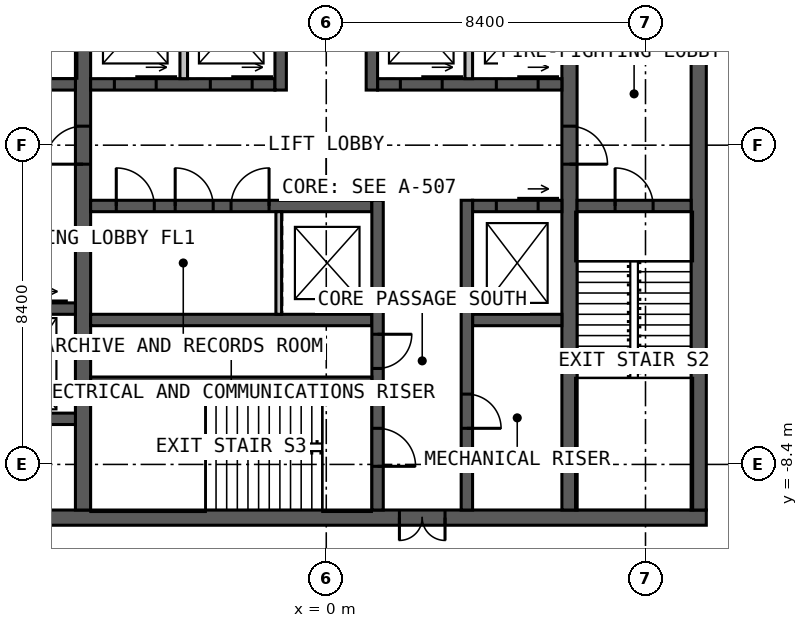
"""IFC4 building model, lengths in metres.
Left out: names, types, materials, properties, quantities, classifications, styles, units other than length and angle.
Written with IfcOpenShell. Run it as: python <this file> out.ifc"""

import sys

from ifc_helpers import new_model, si_unit, direction, frame, frame_2d, origin, place, context, subcontext, project, spatial, rectangle, extrude, element, fill, save


model = new_model("IFC4")
c1 = context("Model", 3, precision=1e-05, world=origin(), true_north=direction((0.0, 1.0)))
c2 = subcontext(c1, "Body", "Model", "MODEL_VIEW")
j1 = project(units=[si_unit("LENGTHUNIT", "METRE"), si_unit("PLANEANGLEUNIT", "RADIAN")], contexts=[c1])
p1 = place(None, origin())
s1 = spatial("IfcSite", under=j1, at=p1, CompositionType="ELEMENT")
p2 = place(p1, origin())
s2 = spatial("IfcBuilding", under=s1, at=p2, CompositionType="ELEMENT")
p3 = place(p2, frame((0.0, 0.0, 272.0)))
s3 = spatial("IfcBuildingStorey", under=s2, at=p3, CompositionType="ELEMENT", Elevation=272.0)
p4 = place(p3, frame((10.0, -9.8, 0.0), z_axis=(0.0, 0.0, 1.0), x_axis=(-1.0, 0.0, 0.0)))
e1 = element("IfcWall", 1, at=p4, inside=s3, PredefinedType="SOLIDWALL", context=c2, shape_type="SweptSolid", body=[
    extrude(rectangle(XDim=20.0, YDim=0.4, at=frame_2d((10.0, 0.0))), origin(), (0.0, 0.0, 1.0), 4.0),
])
p5 = place(p4, frame((6.875, 0.0, 0.0)))
e2 = element("IfcOpeningElement", 2, at=p5, cuts=e1, PredefinedType="OPENING", context=c2, shape_type="SweptSolid", body=[
    extrude(rectangle(XDim=1.2, YDim=2.2, at=frame_2d((0.6, 1.1))), frame((0.0, 0.21, 0.0), z_axis=(0.0, -1.0, 0.0), x_axis=(1.0, 0.0, 0.0)), (0.0, 0.0, 1.0), 0.42),
])
p6 = place(p3, frame((9.8, -9.6, 0.0), z_axis=(0.0, 0.0, 1.0), x_axis=(0.0, 1.0, 0.0)))
e3 = element("IfcWall", 3, at=p6, inside=s3, PredefinedType="SOLIDWALL", context=c2, shape_type="SweptSolid", body=[
    extrude(rectangle(XDim=19.2, YDim=0.4, at=frame_2d((9.6, 0.0))), origin(), (0.0, 0.0, 1.0), 4.0),
])
p7 = place(p3, frame((-6.4, -9.6, 0.0), z_axis=(0.0, 0.0, 1.0), x_axis=(0.0, 1.0, 0.0)))
e4 = element("IfcWall", 4, at=p7, inside=s3, PredefinedType="SOLIDWALL", context=c2, shape_type="SweptSolid", body=[
    extrude(rectangle(XDim=19.2, YDim=0.4, at=frame_2d((9.6, 0.0))), origin(), (0.0, 0.0, 1.0), 4.0),
])
p8 = place(p7, frame((9.1, 0.0, 0.0)))
e5 = element("IfcOpeningElement", 5, at=p8, cuts=e4, PredefinedType="OPENING", context=c2, shape_type="SweptSolid", body=[
    extrude(rectangle(XDim=1.0, YDim=2.2, at=frame_2d((0.5, 1.1))), frame((0.0, 0.21, 0.0), z_axis=(0.0, -1.0, 0.0), x_axis=(1.0, 0.0, 0.0)), (0.0, 0.0, 1.0), 0.42),
])
p9 = place(p3, frame((6.4, 9.6, 0.0), z_axis=(0.0, 0.0, 1.0), x_axis=(0.0, -1.0, 0.0)))
e6 = element("IfcWall", 6, at=p9, inside=s3, PredefinedType="SOLIDWALL", context=c2, shape_type="SweptSolid", body=[
    extrude(rectangle(XDim=19.2, YDim=0.4, at=frame_2d((9.6, 0.0))), origin(), (0.0, 0.0, 1.0), 4.0),
])
p10 = place(p9, frame((9.1, 0.0, 0.0)))
e7 = element("IfcOpeningElement", 7, at=p10, cuts=e6, PredefinedType="OPENING", context=c2, shape_type="SweptSolid", body=[
    extrude(rectangle(XDim=1.0, YDim=2.2, at=frame_2d((0.5, 1.1))), frame((0.0, 0.21, 0.0), z_axis=(0.0, -1.0, 0.0), x_axis=(1.0, 0.0, 0.0)), (0.0, 0.0, 1.0), 0.42),
])
p11 = place(p3, frame((-6.2, 1.6, 0.0), z_axis=(0.0, 0.0, 1.0), x_axis=(1.0, 0.0, 0.0)))
e8 = element("IfcWall", 8, at=p11, inside=s3, PredefinedType="SOLIDWALL", context=c2, shape_type="SweptSolid", body=[
    extrude(rectangle(XDim=4.85, YDim=0.3, at=frame_2d((2.425, 0.0))), origin(), (0.0, 0.0, 1.0), 4.0),
])
p12 = place(p11, frame((0.625, 0.0, 0.0)))
e9 = element("IfcOpeningElement", 9, at=p12, cuts=e8, PredefinedType="OPENING", context=c2, shape_type="SweptSolid", body=[
    extrude(rectangle(XDim=1.1, YDim=2.2, at=frame_2d((0.55, 1.1))), frame((0.0, 0.16, 0.0), z_axis=(0.0, -1.0, 0.0), x_axis=(1.0, 0.0, 0.0)), (0.0, 0.0, 1.0), 0.32),
])
p13 = place(p11, frame((3.15, 0.0, 0.0)))
e10 = element("IfcOpeningElement", 10, at=p13, cuts=e8, PredefinedType="OPENING", context=c2, shape_type="SweptSolid", body=[
    extrude(rectangle(XDim=1.1, YDim=2.2, at=frame_2d((0.55, 1.1))), frame((0.0, 0.16, 0.0), z_axis=(0.0, -1.0, 0.0), x_axis=(1.0, 0.0, 0.0)), (0.0, 0.0, 1.0), 0.32),
])
p14 = place(p3, frame((1.35, 1.6, 0.0), z_axis=(0.0, 0.0, 1.0), x_axis=(1.0, 0.0, 0.0)))
e11 = element("IfcWall", 11, at=p14, inside=s3, PredefinedType="SOLIDWALL", context=c2, shape_type="SweptSolid", body=[
    extrude(rectangle(XDim=4.85, YDim=0.3, at=frame_2d((2.425, 0.0))), origin(), (0.0, 0.0, 1.0), 4.0),
])
p15 = place(p14, frame((0.6, 0.0, 0.0)))
e12 = element("IfcOpeningElement", 12, at=p15, cuts=e11, PredefinedType="OPENING", context=c2, shape_type="SweptSolid", body=[
    extrude(rectangle(XDim=1.1, YDim=2.2, at=frame_2d((0.55, 1.1))), frame((0.0, 0.16, 0.0), z_axis=(0.0, -1.0, 0.0), x_axis=(1.0, 0.0, 0.0)), (0.0, 0.0, 1.0), 0.32),
])
p16 = place(p14, frame((3.125, 0.0, 0.0)))
e13 = element("IfcOpeningElement", 13, at=p16, cuts=e11, PredefinedType="OPENING", context=c2, shape_type="SweptSolid", body=[
    extrude(rectangle(XDim=1.1, YDim=2.2, at=frame_2d((0.55, 1.1))), frame((0.0, 0.16, 0.0), z_axis=(0.0, -1.0, 0.0), x_axis=(1.0, 0.0, 0.0)), (0.0, 0.0, 1.0), 0.32),
])
p17 = place(p3, frame((-1.2, 1.45, 0.0), z_axis=(0.0, 0.0, 1.0), x_axis=(0.0, 1.0, 0.0)))
e14 = element("IfcWall", 14, at=p17, inside=s3, PredefinedType="SOLIDWALL", context=c2, shape_type="SweptSolid", body=[
    extrude(rectangle(XDim=8.15, YDim=0.3, at=frame_2d((4.075, 0.0))), origin(), (0.0, 0.0, 1.0), 4.0),
])
p18 = place(p17, frame((5.05, 0.0, 0.0)))
e15 = element("IfcOpeningElement", 15, at=p18, cuts=e14, PredefinedType="OPENING", context=c2, shape_type="SweptSolid", body=[
    extrude(rectangle(XDim=1.0, YDim=2.2, at=frame_2d((0.5, 1.1))), frame((0.0, 0.16, 0.0), z_axis=(0.0, -1.0, 0.0), x_axis=(1.0, 0.0, 0.0)), (0.0, 0.0, 1.0), 0.32),
])
p19 = place(p3, frame((1.2, 1.45, 0.0), z_axis=(0.0, 0.0, 1.0), x_axis=(0.0, 1.0, 0.0)))
e16 = element("IfcWall", 16, at=p19, inside=s3, PredefinedType="SOLIDWALL", context=c2, shape_type="SweptSolid", body=[
    extrude(rectangle(XDim=8.15, YDim=0.3, at=frame_2d((4.075, 0.0))), origin(), (0.0, 0.0, 1.0), 4.0),
])
p20 = place(p19, frame((3.8, 0.0, 0.0)))
e17 = element("IfcOpeningElement", 17, at=p20, cuts=e16, PredefinedType="OPENING", context=c2, shape_type="SweptSolid", body=[
    extrude(rectangle(XDim=1.0, YDim=2.2, at=frame_2d((0.5, 1.1))), frame((0.0, 0.16, 0.0), z_axis=(0.0, -1.0, 0.0), x_axis=(1.0, 0.0, 0.0)), (0.0, 0.0, 1.0), 0.32),
])
p21 = place(p19, frame((6.15, 0.0, 0.0)))
e18 = element("IfcOpeningElement", 18, at=p21, cuts=e16, PredefinedType="OPENING", context=c2, shape_type="SweptSolid", body=[
    extrude(rectangle(XDim=1.0, YDim=2.2, at=frame_2d((0.5, 1.1))), frame((0.0, 0.16, 0.0), z_axis=(0.0, -1.0, 0.0), x_axis=(1.0, 0.0, 0.0)), (0.0, 0.0, 1.0), 0.32),
])
p22 = place(p3, frame((-6.2, -1.6, 0.0), z_axis=(0.0, 0.0, 1.0), x_axis=(1.0, 0.0, 0.0)))
e19 = element("IfcWall", 19, at=p22, inside=s3, PredefinedType="SOLIDWALL", context=c2, shape_type="SweptSolid", body=[
    extrude(rectangle(XDim=7.4, YDim=0.3, at=frame_2d((3.7, 0.0))), origin(), (0.0, 0.0, 1.0), 4.0),
])
p23 = place(p22, frame((0.675, 0.0, 0.0)))
e20 = element("IfcOpeningElement", 20, at=p23, cuts=e19, PredefinedType="OPENING", context=c2, shape_type="SweptSolid", body=[
    extrude(rectangle(XDim=1.0, YDim=2.2, at=frame_2d((0.5, 1.1))), frame((0.0, 0.16, 0.0), z_axis=(0.0, -1.0, 0.0), x_axis=(1.0, 0.0, 0.0)), (0.0, 0.0, 1.0), 0.32),
])
p24 = place(p22, frame((2.225, 0.0, 0.0)))
e21 = element("IfcOpeningElement", 21, at=p24, cuts=e19, PredefinedType="OPENING", context=c2, shape_type="SweptSolid", body=[
    extrude(rectangle(XDim=1.0, YDim=2.2, at=frame_2d((0.5, 1.1))), frame((0.0, 0.16, 0.0), z_axis=(0.0, -1.0, 0.0), x_axis=(1.0, 0.0, 0.0)), (0.0, 0.0, 1.0), 0.32),
])
p25 = place(p22, frame((3.695, 0.0, 0.0)))
e22 = element("IfcOpeningElement", 22, at=p25, cuts=e19, PredefinedType="OPENING", context=c2, shape_type="SweptSolid", body=[
    extrude(rectangle(XDim=1.0, YDim=2.2, at=frame_2d((0.5, 1.1))), frame((0.0, 0.16, 0.0), z_axis=(0.0, -1.0, 0.0), x_axis=(1.0, 0.0, 0.0)), (0.0, 0.0, 1.0), 0.32),
])
p26 = place(p3, frame((3.85, -1.6, 0.0), z_axis=(0.0, 0.0, 1.0), x_axis=(1.0, 0.0, 0.0)))
e23 = element("IfcWall", 23, at=p26, inside=s3, PredefinedType="SOLIDWALL", context=c2, shape_type="SweptSolid", body=[
    extrude(rectangle(XDim=2.35, YDim=0.3, at=frame_2d((1.175, 0.0))), origin(), (0.0, 0.0, 1.0), 4.0),
])
p27 = place(p26, frame((0.625, 0.0, 0.0)))
e24 = element("IfcOpeningElement", 24, at=p27, cuts=e23, PredefinedType="OPENING", context=c2, shape_type="SweptSolid", body=[
    extrude(rectangle(XDim=1.1, YDim=2.2, at=frame_2d((0.55, 1.1))), frame((0.0, 0.16, 0.0), z_axis=(0.0, -1.0, 0.0), x_axis=(1.0, 0.0, 0.0)), (0.0, 0.0, 1.0), 0.32),
])
p28 = place(p3, frame((-6.2, -4.6, 0.0), z_axis=(0.0, 0.0, 1.0), x_axis=(1.0, 0.0, 0.0)))
e25 = element("IfcWall", 25, at=p28, inside=s3, PredefinedType="SOLIDWALL", context=c2, shape_type="SweptSolid", body=[
    extrude(rectangle(XDim=7.4, YDim=0.3, at=frame_2d((3.7, 0.0))), origin(), (0.0, 0.0, 1.0), 4.0),
])
p29 = place(p3, frame((3.85, -4.6, 0.0), z_axis=(0.0, 0.0, 1.0), x_axis=(1.0, 0.0, 0.0)))
e26 = element("IfcWall", 26, at=p29, inside=s3, PredefinedType="SOLIDWALL", context=c2, shape_type="SweptSolid", body=[
    extrude(rectangle(XDim=2.35, YDim=0.3, at=frame_2d((1.175, 0.0))), origin(), (0.0, 0.0, 1.0), 4.0),
])
p30 = place(p3, frame((1.35, -1.45, 0.0), z_axis=(0.0, 0.0, 1.0), x_axis=(0.0, -1.0, 0.0)))
e27 = element("IfcWall", 27, at=p30, inside=s3, PredefinedType="SOLIDWALL", context=c2, shape_type="SweptSolid", body=[
    extrude(rectangle(XDim=8.15, YDim=0.3, at=frame_2d((4.075, 0.0))), origin(), (0.0, 0.0, 1.0), 4.0),
])
p31 = place(p30, frame((6.0, 0.0, 0.0)))
e28 = element("IfcOpeningElement", 28, at=p31, cuts=e27, PredefinedType="OPENING", context=c2, shape_type="SweptSolid", body=[
    extrude(rectangle(XDim=1.0, YDim=2.2, at=frame_2d((0.5, 1.1))), frame((0.0, 0.16, 0.0), z_axis=(0.0, -1.0, 0.0), x_axis=(1.0, 0.0, 0.0)), (0.0, 0.0, 1.0), 0.32),
])
p32 = place(p30, frame((3.525, 0.0, 0.0)))
e29 = element("IfcOpeningElement", 29, at=p32, cuts=e27, PredefinedType="OPENING", context=c2, shape_type="SweptSolid", body=[
    extrude(rectangle(XDim=0.9, YDim=2.2, at=frame_2d((0.45, 1.1))), frame((0.0, 0.16, 0.0), z_axis=(0.0, -1.0, 0.0), x_axis=(1.0, 0.0, 0.0)), (0.0, 0.0, 1.0), 0.32),
])
p33 = place(p3, frame((3.7, -1.45, 0.0), z_axis=(0.0, 0.0, 1.0), x_axis=(0.0, -1.0, 0.0)))
e30 = element("IfcWall", 30, at=p33, inside=s3, PredefinedType="SOLIDWALL", context=c2, shape_type="SweptSolid", body=[
    extrude(rectangle(XDim=8.15, YDim=0.3, at=frame_2d((4.075, 0.0))), origin(), (0.0, 0.0, 1.0), 4.0),
])
p34 = place(p33, frame((5.1, 0.0, 0.0)))
e31 = element("IfcOpeningElement", 31, at=p34, cuts=e30, PredefinedType="OPENING", context=c2, shape_type="SweptSolid", body=[
    extrude(rectangle(XDim=0.9, YDim=2.2, at=frame_2d((0.45, 1.1))), frame((0.0, 0.16, 0.0), z_axis=(0.0, -1.0, 0.0), x_axis=(1.0, 0.0, 0.0)), (0.0, 0.0, 1.0), 0.32),
])
p35 = place(p3, frame((-6.2, -6.2, 0.0), z_axis=(0.0, 0.0, 1.0), x_axis=(1.0, 0.0, 0.0)))
e32 = element("IfcWall", 32, at=p35, inside=s3, PredefinedType="SOLIDWALL", context=c2, shape_type="SweptSolid", body=[
    extrude(rectangle(XDim=7.4, YDim=0.2, at=frame_2d((3.7, 0.0))), origin(), (0.0, 0.0, 1.0), 4.0),
])
p36 = place(p3, frame((-9.6, 1.6, 0.0), z_axis=(0.0, 0.0, 1.0), x_axis=(1.0, 0.0, 0.0)))
e33 = element("IfcWall", 33, at=p36, inside=s3, PredefinedType="SOLIDWALL", context=c2, shape_type="SweptSolid", body=[
    extrude(rectangle(XDim=3.0, YDim=0.3, at=frame_2d((1.5, 0.0))), origin(), (0.0, 0.0, 1.0), 4.0),
])
p37 = place(p36, frame((1.0, 0.0, 0.0)))
e34 = element("IfcOpeningElement", 34, at=p37, cuts=e33, PredefinedType="OPENING", context=c2, shape_type="SweptSolid", body=[
    extrude(rectangle(XDim=1.0, YDim=2.2, at=frame_2d((0.5, 1.1))), frame((0.0, 0.16, 0.0), z_axis=(0.0, -1.0, 0.0), x_axis=(1.0, 0.0, 0.0)), (0.0, 0.0, 1.0), 0.32),
])
p38 = place(p3, frame((6.6, -1.6, 0.0), z_axis=(0.0, 0.0, 1.0), x_axis=(1.0, 0.0, 0.0)))
e35 = element("IfcWall", 35, at=p38, inside=s3, PredefinedType="SOLIDWALL", context=c2, shape_type="SweptSolid", body=[
    extrude(rectangle(XDim=3.0, YDim=0.3, at=frame_2d((1.5, 0.0))), origin(), (0.0, 0.0, 1.0), 4.0),
])
p39 = place(p38, frame((1.0, 0.0, 0.0)))
e36 = element("IfcOpeningElement", 36, at=p39, cuts=e35, PredefinedType="OPENING", context=c2, shape_type="SweptSolid", body=[
    extrude(rectangle(XDim=1.0, YDim=2.2, at=frame_2d((0.5, 1.1))), frame((0.0, 0.16, 0.0), z_axis=(0.0, -1.0, 0.0), x_axis=(1.0, 0.0, 0.0)), (0.0, 0.0, 1.0), 0.32),
])
p40 = place(p3, frame((-9.6, -4.3, 0.0), z_axis=(0.0, 0.0, 1.0), x_axis=(1.0, 0.0, 0.0)))
e37 = element("IfcWall", 37, at=p40, inside=s3, PredefinedType="SOLIDWALL", context=c2, shape_type="SweptSolid", body=[
    extrude(rectangle(XDim=3.0, YDim=0.3, at=frame_2d((1.5, 0.0))), origin(), (0.0, 0.0, 1.0), 4.0),
])
p41 = place(p40, frame((1.15, 0.0, 0.0)))
e38 = element("IfcOpeningElement", 38, at=p41, cuts=e37, PredefinedType="OPENING", context=c2, shape_type="SweptSolid", body=[
    extrude(rectangle(XDim=1.1, YDim=2.2, at=frame_2d((0.55, 1.1))), frame((0.0, 0.16, 0.0), z_axis=(0.0, -1.0, 0.0), x_axis=(1.0, 0.0, 0.0)), (0.0, 0.0, 1.0), 0.32),
])
p42 = place(p3, frame((-9.6, -7.2, 0.0), z_axis=(0.0, 0.0, 1.0), x_axis=(1.0, 0.0, 0.0)))
e39 = element("IfcWall", 39, at=p42, inside=s3, PredefinedType="SOLIDWALL", context=c2, shape_type="SweptSolid", body=[
    extrude(rectangle(XDim=3.0, YDim=0.3, at=frame_2d((1.5, 0.0))), origin(), (0.0, 0.0, 1.0), 4.0),
])
for number, where, z_axis, x_axis in (
    (40, (-3.75, 1.75, 0.0), (0.0, 0.0, 1.0), (0.0, 1.0, 0.0)),
    (41, (3.75, 1.75, 0.0), (0.0, 0.0, 1.0), (0.0, 1.0, 0.0)),
):
    element("IfcWall", number, at=place(p3, frame(where, z_axis=z_axis, x_axis=x_axis)), inside=s3, PredefinedType="SOLIDWALL", context=c2, shape_type="SweptSolid", body=[
        extrude(rectangle(XDim=2.7, YDim=0.2, at=frame_2d((1.35, 0.0))), origin(), (0.0, 0.0, 1.0), 3.75),
    ])
p43 = place(p3, frame((-1.25, -1.75, 0.0), z_axis=(0.0, 0.0, 1.0), x_axis=(0.0, -1.0, 0.0)))
e42 = element("IfcWall", 42, at=p43, inside=s3, PredefinedType="PARTITIONING", context=c2, shape_type="SweptSolid", body=[
    extrude(rectangle(XDim=2.7, YDim=0.15, at=frame_2d((1.35, 0.0))), origin(), (0.0, 0.0, 1.0), 3.75),
])
p44 = place(p5, origin())
e43 = element("IfcDoor", 43, at=p44, inside=s3, OperationType="DOUBLE_DOOR_SINGLE_SWING", PredefinedType="DOOR", context=c2, shape_type="SweptSolid", body=[
    extrude(rectangle(XDim=1.2, YDim=2.2, at=frame_2d((0.6, 1.1))), frame((0.0, 0.025, 0.0), z_axis=(0.0, -1.0, 0.0), x_axis=(1.0, 0.0, 0.0)), (0.0, 0.0, 1.0), 0.05),
])
fill(e2, e43)
p45 = place(p8, origin())
e44 = element("IfcDoor", 44, at=p45, inside=s3, OperationType="SINGLE_SWING_LEFT", PredefinedType="DOOR", context=c2, shape_type="SweptSolid", body=[
    extrude(rectangle(XDim=1.0, YDim=2.2, at=frame_2d((0.5, 1.1))), frame((0.0, 0.025, 0.0), z_axis=(0.0, -1.0, 0.0), x_axis=(1.0, 0.0, 0.0)), (0.0, 0.0, 1.0), 0.05),
])
fill(e5, e44)
p46 = place(p10, origin())
e45 = element("IfcDoor", 45, at=p46, inside=s3, OperationType="SINGLE_SWING_RIGHT", PredefinedType="DOOR", context=c2, shape_type="SweptSolid", body=[
    extrude(rectangle(XDim=1.0, YDim=2.2, at=frame_2d((0.5, 1.1))), frame((0.0, 0.025, 0.0), z_axis=(0.0, -1.0, 0.0), x_axis=(1.0, 0.0, 0.0)), (0.0, 0.0, 1.0), 0.05),
])
fill(e7, e45)
p47 = place(p39, origin())
e46 = element("IfcDoor", 46, at=p47, inside=s3, OperationType="SINGLE_SWING_LEFT", PredefinedType="DOOR", context=c2, shape_type="SweptSolid", body=[
    extrude(rectangle(XDim=1.0, YDim=2.2, at=frame_2d((0.5, 1.1))), frame((0.0, 0.025, 0.0), z_axis=(0.0, -1.0, 0.0), x_axis=(1.0, 0.0, 0.0)), (0.0, 0.0, 1.0), 0.05),
])
fill(e36, e46)
p48 = place(p31, origin())
e47 = element("IfcDoor", 47, at=p48, inside=s3, OperationType="SINGLE_SWING_RIGHT", PredefinedType="DOOR", context=c2, shape_type="SweptSolid", body=[
    extrude(rectangle(XDim=1.0, YDim=2.2, at=frame_2d((0.5, 1.1))), frame((0.0, 0.025, 0.0), z_axis=(0.0, -1.0, 0.0), x_axis=(1.0, 0.0, 0.0)), (0.0, 0.0, 1.0), 0.05),
])
fill(e28, e47)
p49 = place(p32, origin())
e48 = element("IfcDoor", 48, at=p49, inside=s3, OperationType="SINGLE_SWING_LEFT", PredefinedType="DOOR", context=c2, shape_type="SweptSolid", body=[
    extrude(rectangle(XDim=0.9, YDim=2.2, at=frame_2d((0.45, 1.1))), frame((0.0, 0.025, 0.0), z_axis=(0.0, -1.0, 0.0), x_axis=(1.0, 0.0, 0.0)), (0.0, 0.0, 1.0), 0.05),
])
fill(e29, e48)
p50 = place(p34, origin())
e49 = element("IfcDoor", 49, at=p50, inside=s3, OperationType="SINGLE_SWING_RIGHT", PredefinedType="DOOR", context=c2, shape_type="SweptSolid", body=[
    extrude(rectangle(XDim=0.9, YDim=2.2, at=frame_2d((0.45, 1.1))), frame((0.0, 0.025, 0.0), z_axis=(0.0, -1.0, 0.0), x_axis=(1.0, 0.0, 0.0)), (0.0, 0.0, 1.0), 0.05),
])
fill(e31, e49)
p51 = place(p23, origin())
e50 = element("IfcDoor", 50, at=p51, inside=s3, OperationType="SINGLE_SWING_LEFT", PredefinedType="DOOR", context=c2, shape_type="SweptSolid", body=[
    extrude(rectangle(XDim=1.0, YDim=2.2, at=frame_2d((0.5, 1.1))), frame((0.0, 0.025, 0.0), z_axis=(0.0, -1.0, 0.0), x_axis=(1.0, 0.0, 0.0)), (0.0, 0.0, 1.0), 0.05),
])
fill(e20, e50)
p52 = place(p24, origin())
e51 = element("IfcDoor", 51, at=p52, inside=s3, OperationType="SINGLE_SWING_LEFT", PredefinedType="DOOR", context=c2, shape_type="SweptSolid", body=[
    extrude(rectangle(XDim=1.0, YDim=2.2, at=frame_2d((0.5, 1.1))), frame((0.0, 0.025, 0.0), z_axis=(0.0, -1.0, 0.0), x_axis=(1.0, 0.0, 0.0)), (0.0, 0.0, 1.0), 0.05),
])
fill(e21, e51)
p53 = place(p25, origin())
e52 = element("IfcDoor", 52, at=p53, inside=s3, OperationType="SINGLE_SWING_RIGHT", PredefinedType="DOOR", context=c2, shape_type="SweptSolid", body=[
    extrude(rectangle(XDim=1.0, YDim=2.2, at=frame_2d((0.5, 1.1))), frame((0.0, 0.025, 0.0), z_axis=(0.0, -1.0, 0.0), x_axis=(1.0, 0.0, 0.0)), (0.0, 0.0, 1.0), 0.05),
])
fill(e22, e52)
p54 = place(p12, origin())
e53 = element("IfcDoor", 53, at=p54, inside=s3, OperationType="SLIDING_TO_LEFT", PredefinedType="DOOR", context=c2, shape_type="SweptSolid", body=[
    extrude(rectangle(XDim=1.1, YDim=2.2, at=frame_2d((0.55, 1.1))), frame((0.0, 0.025, 0.0), z_axis=(0.0, -1.0, 0.0), x_axis=(1.0, 0.0, 0.0)), (0.0, 0.0, 1.0), 0.05),
])
fill(e9, e53)
p55 = place(p13, origin())
e54 = element("IfcDoor", 54, at=p55, inside=s3, OperationType="SLIDING_TO_LEFT", PredefinedType="DOOR", context=c2, shape_type="SweptSolid", body=[
    extrude(rectangle(XDim=1.1, YDim=2.2, at=frame_2d((0.55, 1.1))), frame((0.0, 0.025, 0.0), z_axis=(0.0, -1.0, 0.0), x_axis=(1.0, 0.0, 0.0)), (0.0, 0.0, 1.0), 0.05),
])
fill(e10, e54)
p56 = place(p15, origin())
e55 = element("IfcDoor", 55, at=p56, inside=s3, OperationType="SLIDING_TO_LEFT", PredefinedType="DOOR", context=c2, shape_type="SweptSolid", body=[
    extrude(rectangle(XDim=1.1, YDim=2.2, at=frame_2d((0.55, 1.1))), frame((0.0, 0.025, 0.0), z_axis=(0.0, -1.0, 0.0), x_axis=(1.0, 0.0, 0.0)), (0.0, 0.0, 1.0), 0.05),
])
fill(e12, e55)
p57 = place(p16, origin())
e56 = element("IfcDoor", 56, at=p57, inside=s3, OperationType="SLIDING_TO_LEFT", PredefinedType="DOOR", context=c2, shape_type="SweptSolid", body=[
    extrude(rectangle(XDim=1.1, YDim=2.2, at=frame_2d((0.55, 1.1))), frame((0.0, 0.025, 0.0), z_axis=(0.0, -1.0, 0.0), x_axis=(1.0, 0.0, 0.0)), (0.0, 0.0, 1.0), 0.05),
])
fill(e13, e56)
p58 = place(p27, origin())
e57 = element("IfcDoor", 57, at=p58, inside=s3, OperationType="SLIDING_TO_LEFT", PredefinedType="DOOR", context=c2, shape_type="SweptSolid", body=[
    extrude(rectangle(XDim=1.1, YDim=2.2, at=frame_2d((0.55, 1.1))), frame((0.0, 0.025, 0.0), z_axis=(0.0, -1.0, 0.0), x_axis=(1.0, 0.0, 0.0)), (0.0, 0.0, 1.0), 0.05),
])
fill(e24, e57)
save(model, sys.argv[1])
